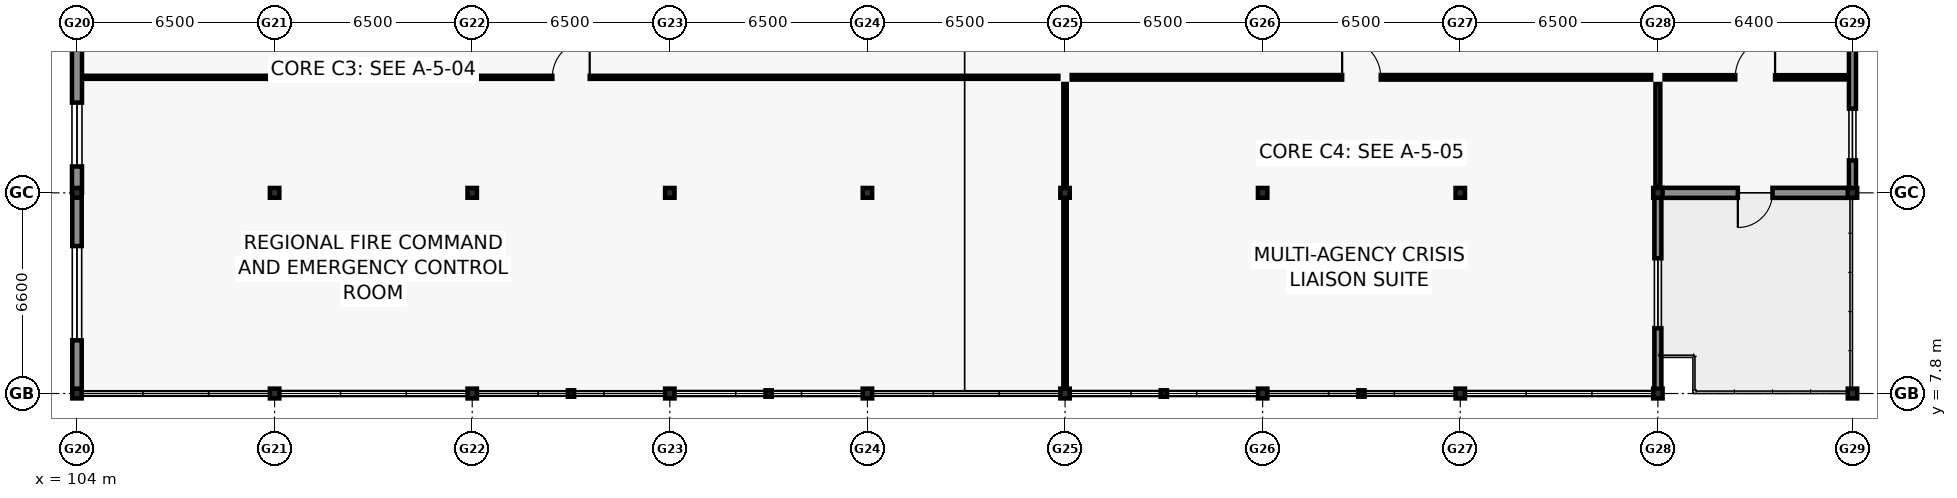
"""IFC4 building model, lengths in metres.
Left out: names, types, materials, properties, quantities, classifications, styles, units other than length and angle.
Written with IfcOpenShell. Run it as: python <this file> out.ifc"""

import sys

from ifc_helpers import new_model, si_unit, direction, frame, frame_2d, origin, origin_2d, place, context, subcontext, project, spatial, rectangle, i_section, extrude, element, fill, save


model = new_model("IFC4")
c1 = context("Model", 3, precision=1e-05, world=origin(), true_north=direction((0.0, 1.0)))
c2 = subcontext(c1, "Body", "Model", "MODEL_VIEW")
j1 = project(units=[si_unit("LENGTHUNIT", "METRE"), si_unit("PLANEANGLEUNIT", "RADIAN")], contexts=[c1])
p1 = place(None, origin())
s1 = spatial("IfcSite", under=j1, at=p1, CompositionType="ELEMENT")
p2 = place(p1, origin())
s2 = spatial("IfcBuilding", under=s1, at=p2, CompositionType="ELEMENT")
p3 = place(p2, frame((0.0, 0.0, 9.6)))
s3 = spatial("IfcBuildingStorey", under=s2, at=p3, CompositionType="ELEMENT", Elevation=9.6)
for number, where, z_axis, x_axis in (
    (1, (104.0, 7.8, 0.0), (0.0, 0.0, 1.0), (1.0, 0.0, 0.0)),
    (2, (104.0, 14.4, 0.0), (0.0, 0.0, 1.0), (1.0, 0.0, 0.0)),
    (3, (110.5, 7.8, 0.0), (0.0, 0.0, 1.0), (1.0, 0.0, 0.0)),
    (4, (110.5, 14.4, 0.0), (0.0, 0.0, 1.0), (1.0, 0.0, 0.0)),
    (5, (117.0, 7.8, 0.0), (0.0, 0.0, 1.0), (1.0, 0.0, 0.0)),
    (6, (117.0, 14.4, 0.0), (0.0, 0.0, 1.0), (1.0, 0.0, 0.0)),
    (7, (123.5, 7.8, 0.0), (0.0, 0.0, 1.0), (1.0, 0.0, 0.0)),
    (8, (123.5, 14.4, 0.0), (0.0, 0.0, 1.0), (1.0, 0.0, 0.0)),
    (9, (130.0, 7.8, 0.0), (0.0, 0.0, 1.0), (1.0, 0.0, 0.0)),
    (10, (130.0, 14.4, 0.0), (0.0, 0.0, 1.0), (1.0, 0.0, 0.0)),
    (11, (136.5, 7.8, 0.0), (0.0, 0.0, 1.0), (1.0, 0.0, 0.0)),
    (12, (136.5, 14.4, 0.0), (0.0, 0.0, 1.0), (1.0, 0.0, 0.0)),
    (13, (143.0, 7.8, 0.0), (0.0, 0.0, 1.0), (1.0, 0.0, 0.0)),
    (14, (143.0, 14.4, 0.0), (0.0, 0.0, 1.0), (1.0, 0.0, 0.0)),
    (15, (149.5, 7.8, 0.0), (0.0, 0.0, 1.0), (1.0, 0.0, 0.0)),
    (16, (149.5, 14.4, 0.0), (0.0, 0.0, 1.0), (1.0, 0.0, 0.0)),
    (17, (156.0, 7.8, 0.0), (0.0, 0.0, 1.0), (1.0, 0.0, 0.0)),
    (18, (156.0, 14.4, 0.0), (0.0, 0.0, 1.0), (1.0, 0.0, 0.0)),
    (19, (162.4, 7.8, 0.0), (0.0, 0.0, 1.0), (1.0, 0.0, 0.0)),
    (20, (162.4, 14.4, 0.0), (0.0, 0.0, 1.0), (1.0, 0.0, 0.0)),
):
    element("IfcColumn", number, at=place(p3, frame(where, z_axis=z_axis, x_axis=x_axis)), inside=s3, PredefinedType="COLUMN", context=c2, shape_type="SweptSolid", body=[
        extrude(i_section(OverallWidth=0.309, OverallDepth=0.321, WebThickness=0.014, FlangeThickness=0.022, FilletRadius=0.017, at=origin_2d()), origin(), (0.0, 0.0, 1.0), 3.9),
    ])
for number, where, z_axis, x_axis in (
    (21, (120.25, 7.8, 0.0), (0.0, 0.0, 1.0), (1.0, 0.0, 0.0)),
    (22, (126.75, 7.8, 0.0), (0.0, 0.0, 1.0), (1.0, 0.0, 0.0)),
    (23, (139.75, 7.8, 0.0), (0.0, 0.0, 1.0), (1.0, 0.0, 0.0)),
    (24, (146.25, 7.8, 0.0), (0.0, 0.0, 1.0), (1.0, 0.0, 0.0)),
):
    element("IfcColumn", number, at=place(p3, frame(where, z_axis=z_axis, x_axis=x_axis)), inside=s3, PredefinedType="PILASTER", context=c2, shape_type="SweptSolid", body=[
        extrude(i_section(OverallWidth=0.205, OverallDepth=0.21, WebThickness=0.009, FlangeThickness=0.014, FilletRadius=0.011, at=origin_2d()), origin(), (0.0, 0.0, 1.0), 3.9),
    ])
p4 = place(p3, frame((162.395, 14.4, 0.0), z_axis=(0.0, 0.0, 1.0), x_axis=(-1.0, 0.0, 0.0)))
e25 = element("IfcWall", 25, at=p4, inside=s3, PredefinedType="SOLIDWALL", context=c2, shape_type="SweptSolid", body=[
    extrude(rectangle(XDim=6.39, YDim=0.33, at=frame_2d((3.195, 0.0))), origin(), (0.0, 0.0, 1.0), 3.02),
])
p5 = place(p4, frame((2.625, 0.0, 0.0)))
e26 = element("IfcOpeningElement", 26, at=p5, cuts=e25, PredefinedType="OPENING", context=c2, shape_type="SweptSolid", body=[
    extrude(rectangle(XDim=1.14, YDim=2.14, at=frame_2d((0.57, 1.07))), frame((0.0, 0.175, 0.0), z_axis=(0.0, -1.0, 0.0), x_axis=(1.0, 0.0, 0.0)), (0.0, 0.0, 1.0), 0.35),
])
p6 = place(p3, frame((156.0, 14.395, 0.0), z_axis=(0.0, 0.0, 1.0), x_axis=(0.0, -1.0, 0.0)))
e27 = element("IfcWall", 27, at=p6, inside=s3, PredefinedType="SOLIDWALL", context=c2, shape_type="SweptSolid", body=[
    extrude(rectangle(XDim=6.59, YDim=0.23, at=frame_2d((3.295, 0.0))), origin(), (0.0, 0.0, 1.0), 3.02),
])
p7 = place(p6, frame((2.145, 0.0, 0.8)))
e28 = element("IfcOpeningElement", 28, at=p7, cuts=e27, PredefinedType="OPENING", context=c2, shape_type="SweptSolid", body=[
    extrude(rectangle(XDim=2.3, YDim=1.15, at=frame_2d((1.15, 0.575))), frame((0.0, 0.125, 0.0), z_axis=(0.0, -1.0, 0.0), x_axis=(1.0, 0.0, 0.0)), (0.0, 0.0, 1.0), 0.25),
])
p8 = place(p3, frame((104.0, 7.805, 0.0), z_axis=(0.0, 0.0, 1.0), x_axis=(0.0, 1.0, 0.0)))
e29 = element("IfcWall", 29, at=p8, inside=s3, PredefinedType="SOLIDWALL", context=c2, shape_type="SweptSolid", body=[
    extrude(rectangle(XDim=6.59, YDim=0.31, at=frame_2d((3.295, 0.0))), origin(), (0.0, 0.0, 1.0), 3.02),
])
p9 = place(p8, frame((1.745, 0.0, 0.8)))
e30 = element("IfcOpeningElement", 30, at=p9, cuts=e29, PredefinedType="OPENING", context=c2, shape_type="SweptSolid", body=[
    extrude(rectangle(XDim=3.1, YDim=1.15, at=frame_2d((1.55, 0.575))), frame((0.0, 0.165, 0.0), z_axis=(0.0, -1.0, 0.0), x_axis=(1.0, 0.0, 0.0)), (0.0, 0.0, 1.0), 0.33),
])
p10 = place(p3, frame((104.0, 14.405, 0.0), z_axis=(0.0, 0.0, 1.0), x_axis=(0.0, 1.0, 0.0)))
e31 = element("IfcWall", 31, at=p10, inside=s3, PredefinedType="SOLIDWALL", context=c2, shape_type="SweptSolid", body=[
    extrude(rectangle(XDim=6.59, YDim=0.33, at=frame_2d((3.295, 0.0))), origin(), (0.0, 0.0, 1.0), 3.02),
])
p11 = place(p10, frame((0.863, 0.0, 0.8)))
e32 = element("IfcOpeningElement", 32, at=p11, cuts=e31, PredefinedType="OPENING", context=c2, shape_type="SweptSolid", body=[
    extrude(rectangle(XDim=2.1, YDim=1.25, at=frame_2d((1.05, 0.625))), frame((0.0, 0.175, 0.0), z_axis=(0.0, -1.0, 0.0), x_axis=(1.0, 0.0, 0.0)), (0.0, 0.0, 1.0), 0.35),
])
p12 = place(p3, frame((162.4, 20.995, 0.0), z_axis=(0.0, 0.0, 1.0), x_axis=(0.0, -1.0, 0.0)))
e33 = element("IfcWall", 33, at=p12, inside=s3, PredefinedType="SOLIDWALL", context=c2, shape_type="SweptSolid", body=[
    extrude(rectangle(XDim=6.59, YDim=0.23, at=frame_2d((3.295, 0.0))), origin(), (0.0, 0.0, 1.0), 3.02),
])
p13 = place(p12, frame((3.827, 0.0, 0.8)))
e34 = element("IfcOpeningElement", 34, at=p13, cuts=e33, PredefinedType="OPENING", context=c2, shape_type="SweptSolid", body=[
    extrude(rectangle(XDim=1.7, YDim=1.25, at=frame_2d((0.85, 0.625))), frame((0.0, 0.125, 0.0), z_axis=(0.0, -1.0, 0.0), x_axis=(1.0, 0.0, 0.0)), (0.0, 0.0, 1.0), 0.25),
])
p14 = place(p3, frame((136.5, 8.02, 0.0), z_axis=(0.0, 0.0, 1.0), x_axis=(0.0, 1.0, 0.0)))
e35 = element("IfcWall", 35, at=p14, inside=s3, PredefinedType="PARTITIONING", context=c2, shape_type="SweptSolid", body=[
    extrude(rectangle(XDim=9.96, YDim=0.11, at=frame_2d((4.98, 0.0))), origin(), (0.0, 0.0, 1.0), 3.0),
])
p15 = place(p3, frame((104.22, 18.2, 0.0), z_axis=(0.0, 0.0, 1.0), x_axis=(1.0, 0.0, 0.0)))
e36 = element("IfcWall", 36, at=p15, inside=s3, PredefinedType="PARTITIONING", context=c2, shape_type="SweptSolid", body=[
    extrude(rectangle(XDim=32.06, YDim=0.1, at=frame_2d((16.03, 0.0))), origin(), (0.0, 0.0, 1.0), 3.0),
])
p16 = place(p15, frame((15.415, 0.0, 0.0)))
e37 = element("IfcOpeningElement", 37, at=p16, cuts=e36, PredefinedType="OPENING", context=c2, shape_type="SweptSolid", body=[
    extrude(rectangle(XDim=1.23, YDim=2.08, at=frame_2d((0.615, 1.04))), frame((0.0, 0.06, 0.0), z_axis=(0.0, -1.0, 0.0), x_axis=(1.0, 0.0, 0.0)), (0.0, 0.0, 1.0), 0.12),
])
p17 = place(p3, frame((156.0, 14.62, 0.0), z_axis=(0.0, 0.0, 1.0), x_axis=(0.0, 1.0, 0.0)))
e38 = element("IfcWall", 38, at=p17, inside=s3, PredefinedType="PARTITIONING", context=c2, shape_type="SweptSolid", body=[
    extrude(rectangle(XDim=3.36, YDim=0.16, at=frame_2d((1.68, 0.0))), origin(), (0.0, 0.0, 1.0), 3.0),
])
p18 = place(p3, frame((136.72, 18.2, 0.0), z_axis=(0.0, 0.0, 1.0), x_axis=(1.0, 0.0, 0.0)))
e39 = element("IfcWall", 39, at=p18, inside=s3, PredefinedType="PARTITIONING", context=c2, shape_type="SweptSolid", body=[
    extrude(rectangle(XDim=19.06, YDim=0.15, at=frame_2d((9.53, 0.0))), origin(), (0.0, 0.0, 1.0), 3.0),
])
p19 = place(p18, frame((8.895, 0.0, 0.0)))
e40 = element("IfcOpeningElement", 40, at=p19, cuts=e39, PredefinedType="OPENING", context=c2, shape_type="SweptSolid", body=[
    extrude(rectangle(XDim=1.27, YDim=2.1, at=frame_2d((0.635, 1.05))), frame((0.0, 0.085, 0.0), z_axis=(0.0, -1.0, 0.0), x_axis=(1.0, 0.0, 0.0)), (0.0, 0.0, 1.0), 0.17),
])
p20 = place(p3, frame((156.22, 18.2, 0.0), z_axis=(0.0, 0.0, 1.0), x_axis=(1.0, 0.0, 0.0)))
e41 = element("IfcWall", 41, at=p20, inside=s3, PredefinedType="PARTITIONING", context=c2, shape_type="SweptSolid", body=[
    extrude(rectangle(XDim=5.96, YDim=0.14, at=frame_2d((2.98, 0.0))), origin(), (0.0, 0.0, 1.0), 3.0),
])
p21 = place(p20, frame((2.325, 0.0, 0.0)))
e42 = element("IfcOpeningElement", 42, at=p21, cuts=e41, PredefinedType="OPENING", context=c2, shape_type="SweptSolid", body=[
    extrude(rectangle(XDim=1.31, YDim=2.14, at=frame_2d((0.655, 1.07))), frame((0.0, 0.08, 0.0), z_axis=(0.0, -1.0, 0.0), x_axis=(1.0, 0.0, 0.0)), (0.0, 0.0, 1.0), 0.16),
])
p22 = place(p5, origin())
e43 = element("IfcDoor", 43, at=p22, inside=s3, OperationType="SINGLE_SWING_RIGHT", PredefinedType="DOOR", context=c2, shape_type="SweptSolid", body=[
    extrude(rectangle(XDim=1.14, YDim=2.14, at=frame_2d((0.57, 1.07))), frame((0.0, 0.025, 0.0), z_axis=(0.0, -1.0, 0.0), x_axis=(1.0, 0.0, 0.0)), (0.0, 0.0, 1.0), 0.05),
])
fill(e26, e43)
p23 = place(p7, origin())
e44 = element("IfcWindow", 44, at=p23, inside=s3, PartitioningType="DOUBLE_PANEL_VERTICAL", PredefinedType="WINDOW", context=c2, shape_type="SweptSolid", body=[
    extrude(rectangle(XDim=2.3, YDim=1.15, at=frame_2d((1.15, 0.575))), frame((0.0, 0.03, 0.0), z_axis=(0.0, -1.0, 0.0), x_axis=(1.0, 0.0, 0.0)), (0.0, 0.0, 1.0), 0.06),
])
fill(e28, e44)
p24 = place(p9, origin())
e45 = element("IfcWindow", 45, at=p24, inside=s3, PartitioningType="TRIPLE_PANEL_VERTICAL", PredefinedType="WINDOW", context=c2, shape_type="SweptSolid", body=[
    extrude(rectangle(XDim=3.1, YDim=1.15, at=frame_2d((1.55, 0.575))), frame((0.0, 0.03, 0.0), z_axis=(0.0, -1.0, 0.0), x_axis=(1.0, 0.0, 0.0)), (0.0, 0.0, 1.0), 0.06),
])
fill(e30, e45)
p25 = place(p11, origin())
e46 = element("IfcWindow", 46, at=p25, inside=s3, PartitioningType="DOUBLE_PANEL_VERTICAL", PredefinedType="WINDOW", context=c2, shape_type="SweptSolid", body=[
    extrude(rectangle(XDim=2.1, YDim=1.25, at=frame_2d((1.05, 0.625))), frame((0.0, 0.03, 0.0), z_axis=(0.0, -1.0, 0.0), x_axis=(1.0, 0.0, 0.0)), (0.0, 0.0, 1.0), 0.06),
])
fill(e32, e46)
p26 = place(p13, origin())
e47 = element("IfcWindow", 47, at=p26, inside=s3, PartitioningType="DOUBLE_PANEL_VERTICAL", PredefinedType="WINDOW", context=c2, shape_type="SweptSolid", body=[
    extrude(rectangle(XDim=1.7, YDim=1.25, at=frame_2d((0.85, 0.625))), frame((0.0, 0.03, 0.0), z_axis=(0.0, -1.0, 0.0), x_axis=(1.0, 0.0, 0.0)), (0.0, 0.0, 1.0), 0.06),
])
fill(e34, e47)
p27 = place(p16, origin())
e48 = element("IfcDoor", 48, at=p27, inside=s3, OperationType="SINGLE_SWING_RIGHT", PredefinedType="DOOR", context=c2, shape_type="SweptSolid", body=[
    extrude(rectangle(XDim=1.23, YDim=2.08, at=frame_2d((0.615, 1.04))), frame((0.0, 0.025, 0.0), z_axis=(0.0, -1.0, 0.0), x_axis=(1.0, 0.0, 0.0)), (0.0, 0.0, 1.0), 0.05),
])
fill(e37, e48)
p28 = place(p19, origin())
e49 = element("IfcDoor", 49, at=p28, inside=s3, OperationType="SINGLE_SWING_LEFT", PredefinedType="DOOR", context=c2, shape_type="SweptSolid", body=[
    extrude(rectangle(XDim=1.27, YDim=2.1, at=frame_2d((0.635, 1.05))), frame((0.0, 0.025, 0.0), z_axis=(0.0, -1.0, 0.0), x_axis=(1.0, 0.0, 0.0)), (0.0, 0.0, 1.0), 0.05),
])
fill(e40, e49)
p29 = place(p21, origin())
e50 = element("IfcDoor", 50, at=p29, inside=s3, OperationType="SINGLE_SWING_RIGHT", PredefinedType="DOOR", context=c2, shape_type="SweptSolid", body=[
    extrude(rectangle(XDim=1.31, YDim=2.14, at=frame_2d((0.655, 1.07))), frame((0.0, 0.025, 0.0), z_axis=(0.0, -1.0, 0.0), x_axis=(1.0, 0.0, 0.0)), (0.0, 0.0, 1.0), 0.05),
])
fill(e42, e50)
save(model, sys.argv[1])
